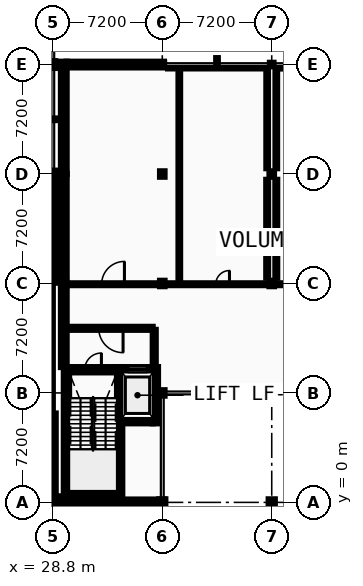
"""IFC4 building model, lengths in metres.
Left out: names, types, materials, properties, quantities, classifications, styles, units other than length and angle.
Written with IfcOpenShell. Run it as: python <this file> out.ifc"""

import sys

from ifc_helpers import new_model, si_unit, direction, frame, frame_2d, origin, origin_2d, place, context, subcontext, project, spatial, rectangle, hollow_circle, i_section, extrude, element, fill, save


model = new_model("IFC4")
c1 = context("Model", 3, precision=1e-05, world=origin(), true_north=direction((0.0, 1.0)))
c2 = subcontext(c1, "Body", "Model", "MODEL_VIEW")
j1 = project(units=[si_unit("LENGTHUNIT", "METRE"), si_unit("PLANEANGLEUNIT", "RADIAN")], contexts=[c1])
p1 = place(None, origin())
s1 = spatial("IfcSite", under=j1, at=p1, CompositionType="ELEMENT")
p2 = place(p1, origin())
s2 = spatial("IfcBuilding", under=s1, at=p2, CompositionType="ELEMENT")
p3 = place(p2, frame((0.0, 0.0, 9.6)))
s3 = spatial("IfcBuildingStorey", under=s2, at=p3, CompositionType="ELEMENT", Elevation=9.6)
for number, where, z_axis, x_axis in (
    (1, (28.8, 0.0, 0.0), (0.0, 0.0, 1.0), (1.0, 0.0, 0.0)),
    (2, (28.8, 21.6, 0.0), (0.0, 0.0, 1.0), (1.0, 0.0, 0.0)),
    (3, (28.8, 28.8, 0.0), (0.0, 0.0, 1.0), (1.0, 0.0, 0.0)),
):
    element("IfcColumn", number, at=place(p3, frame(where, z_axis=z_axis, x_axis=x_axis)), inside=s3, PredefinedType="COLUMN", context=c2, shape_type="SweptSolid", body=[
        extrude(i_section(OverallWidth=0.3, OverallDepth=0.45, WebThickness=0.014, FlangeThickness=0.026, FilletRadius=0.027, at=origin_2d()), origin(), (0.0, 0.0, 1.0), 4.4),
    ])
for number, where, z_axis, x_axis in (
    (4, (29.52, 0.0, 0.0), (0.0, 0.0, 1.0), (1.0, 0.0, 0.0)),
    (5, (29.52, 14.4, 0.0), (0.0, 0.0, 1.0), (1.0, 0.0, 0.0)),
    (6, (29.52, 21.6, 0.0), (0.0, 0.0, 1.0), (1.0, 0.0, 0.0)),
):
    element("IfcColumn", number, at=place(p3, frame(where, z_axis=z_axis, x_axis=x_axis)), inside=s3, PredefinedType="COLUMN", context=c2, shape_type="SweptSolid", body=[
        extrude(i_section(OverallWidth=0.3, OverallDepth=0.36, WebThickness=0.012, FlangeThickness=0.022, FilletRadius=0.027, at=origin_2d()), origin(), (0.0, 0.0, 1.0), 4.4),
    ])
p4 = place(p3, frame((29.52, 28.8, 0.0), z_axis=(0.0, 0.0, 1.0), x_axis=(1.0, 0.0, 0.0)))
e7 = element("IfcColumn", 7, at=p4, inside=s3, PredefinedType="COLUMN", context=c2, shape_type="SweptSolid", body=[
    extrude(i_section(OverallWidth=0.24, OverallDepth=0.24, WebThickness=0.01, FlangeThickness=0.017, FilletRadius=0.021, at=origin_2d()), origin(), (0.0, 0.0, 1.0), 4.4),
])
p5 = place(p3, frame((36.0, 0.0, 0.0), z_axis=(0.0, 0.0, 1.0), x_axis=(1.0, 0.0, 0.0)))
e8 = element("IfcColumn", 8, at=p5, inside=s3, PredefinedType="COLUMN", context=c2, shape_type="SweptSolid", body=[
    extrude(hollow_circle(Radius=0.203, WallThickness=0.016, at=origin_2d()), origin(), (0.0, 0.0, 1.0), 4.4),
])
for number, where, z_axis, x_axis in (
    (9, (36.0, 7.2, 0.0), (0.0, 0.0, 1.0), (1.0, 0.0, 0.0)),
    (10, (36.0, 14.4, 0.0), (0.0, 0.0, 1.0), (1.0, 0.0, 0.0)),
    (11, (36.0, 21.6, 0.0), (0.0, 0.0, 1.0), (1.0, 0.0, 0.0)),
):
    element("IfcColumn", number, at=place(p3, frame(where, z_axis=z_axis, x_axis=x_axis)), inside=s3, PredefinedType="COLUMN", context=c2, shape_type="SweptSolid", body=[
        extrude(i_section(OverallWidth=0.3, OverallDepth=0.36, WebThickness=0.012, FlangeThickness=0.022, FilletRadius=0.027, at=origin_2d()), origin(), (0.0, 0.0, 1.0), 4.4),
    ])
p6 = place(p3, frame((36.0, 28.8, 0.0), z_axis=(0.0, 0.0, 1.0), x_axis=(1.0, 0.0, 0.0)))
e12 = element("IfcColumn", 12, at=p6, inside=s3, PredefinedType="COLUMN", context=c2, shape_type="SweptSolid", body=[
    extrude(i_section(OverallWidth=0.24, OverallDepth=0.24, WebThickness=0.01, FlangeThickness=0.017, FilletRadius=0.021, at=origin_2d()), origin(), (0.0, 0.0, 1.0), 4.4),
])
p7 = place(p3, frame((43.2, 0.0, 0.0), z_axis=(0.0, 0.0, 1.0), x_axis=(1.0, 0.0, 0.0)))
e13 = element("IfcColumn", 13, at=p7, inside=s3, PredefinedType="COLUMN", context=c2, shape_type="SweptSolid", body=[
    extrude(hollow_circle(Radius=0.203, WallThickness=0.016, at=origin_2d()), origin(), (0.0, 0.0, 1.0), 4.4),
])
for number, where, z_axis, x_axis in (
    (14, (43.2, 7.2, 0.0), (0.0, 0.0, 1.0), (1.0, 0.0, 0.0)),
    (15, (43.2, 14.4, 0.0), (0.0, 0.0, 1.0), (1.0, 0.0, 0.0)),
    (16, (43.2, 21.6, 0.0), (0.0, 0.0, 1.0), (1.0, 0.0, 0.0)),
):
    element("IfcColumn", number, at=place(p3, frame(where, z_axis=z_axis, x_axis=x_axis)), inside=s3, PredefinedType="COLUMN", context=c2, shape_type="SweptSolid", body=[
        extrude(i_section(OverallWidth=0.3, OverallDepth=0.36, WebThickness=0.012, FlangeThickness=0.022, FilletRadius=0.027, at=origin_2d()), origin(), (0.0, 0.0, 1.0), 4.4),
    ])
p8 = place(p3, frame((43.2, 28.8, 0.0), z_axis=(0.0, 0.0, 1.0), x_axis=(1.0, 0.0, 0.0)))
e17 = element("IfcColumn", 17, at=p8, inside=s3, PredefinedType="COLUMN", context=c2, shape_type="SweptSolid", body=[
    extrude(i_section(OverallWidth=0.24, OverallDepth=0.24, WebThickness=0.01, FlangeThickness=0.017, FilletRadius=0.021, at=origin_2d()), origin(), (0.0, 0.0, 1.0), 4.4),
])
p9 = place(p3, frame((28.8, -0.19, 0.0), z_axis=(0.0, 0.0, 1.0), x_axis=(0.0, 1.0, 0.0)))
e18 = element("IfcWall", 18, at=p9, inside=s3, PredefinedType="STANDARD", context=c2, shape_type="SweptSolid", body=[
    extrude(rectangle(XDim=6.04, YDim=0.38, at=frame_2d((3.02, 0.0))), origin(), (0.0, 0.0, 1.0), 4.2),
])
p10 = place(p9, frame((2.505, 0.0, 0.95)))
e19 = element("IfcOpeningElement", 19, at=p10, cuts=e18, PredefinedType="OPENING", context=c2, shape_type="SweptSolid", body=[
    extrude(rectangle(XDim=1.03, YDim=1.332, at=frame_2d((0.515, 0.666))), frame((0.0, 0.2, 0.0), z_axis=(0.0, -1.0, 0.0), x_axis=(1.0, 0.0, 0.0)), (0.0, 0.0, 1.0), 0.4),
])
p11 = place(p3, frame((28.8, 14.45, 0.0), z_axis=(0.0, 0.0, 1.0), x_axis=(0.0, 1.0, 0.0)))
e20 = element("IfcWall", 20, at=p11, inside=s3, PredefinedType="STANDARD", context=c2, shape_type="SweptSolid", body=[
    extrude(rectangle(XDim=7.15, YDim=0.38, at=frame_2d((3.575, 0.0))), origin(), (0.0, 0.0, 1.0), 4.2),
])
p12 = place(p11, frame((1.613, 0.0, 0.95)))
e21 = element("IfcOpeningElement", 21, at=p12, cuts=e20, PredefinedType="OPENING", context=c2, shape_type="SweptSolid", body=[
    extrude(rectangle(XDim=1.064, YDim=1.332, at=frame_2d((0.532, 0.666))), frame((0.0, 0.2, 0.0), z_axis=(0.0, -1.0, 0.0), x_axis=(1.0, 0.0, 0.0)), (0.0, 0.0, 1.0), 0.4),
])
p13 = place(p11, frame((4.473, 0.0, 0.95)))
e22 = element("IfcOpeningElement", 22, at=p13, cuts=e20, PredefinedType="OPENING", context=c2, shape_type="SweptSolid", body=[
    extrude(rectangle(XDim=1.064, YDim=1.332, at=frame_2d((0.532, 0.666))), frame((0.0, 0.2, 0.0), z_axis=(0.0, -1.0, 0.0), x_axis=(1.0, 0.0, 0.0)), (0.0, 0.0, 1.0), 0.4),
])
p14 = place(p3, frame((29.71, 0.0, 0.0), z_axis=(0.0, 0.0, 1.0), x_axis=(1.0, 0.0, 0.0)))
e23 = element("IfcWall", 23, at=p14, inside=s3, PredefinedType="STANDARD", context=c2, shape_type="SweptSolid", body=[
    extrude(rectangle(XDim=6.4, YDim=0.38, at=frame_2d((3.2, 0.0))), origin(), (0.0, 0.0, 1.0), 3.895),
])
p15 = place(p3, frame((36.11, 28.8, 0.0), z_axis=(0.0, 0.0, 1.0), x_axis=(-1.0, 0.0, 0.0)))
e24 = element("IfcWall", 24, at=p15, inside=s3, PredefinedType="STANDARD", context=c2, shape_type="SweptSolid", body=[
    extrude(rectangle(XDim=6.4, YDim=0.38, at=frame_2d((3.2, 0.0))), origin(), (0.0, 0.0, 1.0), 3.9),
])
p16 = place(p3, frame((29.52, 0.4, 0.0), z_axis=(0.0, 0.0, 1.0), x_axis=(0.0, -1.0, 0.0)))
e25 = element("IfcWall", 25, at=p16, inside=s3, PredefinedType="STANDARD", context=c2, shape_type="SweptSolid", body=[
    extrude(rectangle(XDim=0.59, YDim=0.38, at=frame_2d((0.295, 0.0))), origin(), (0.0, 0.0, 1.0), 4.2),
])
p17 = place(p3, frame((29.52, 14.4, 0.0), z_axis=(0.0, 0.0, 1.0), x_axis=(0.0, -1.0, 0.0)))
e26 = element("IfcWall", 26, at=p17, inside=s3, PredefinedType="STANDARD", context=c2, shape_type="SweptSolid", body=[
    extrude(rectangle(XDim=5.5, YDim=0.38, at=frame_2d((2.75, 0.0))), origin(), (0.0, 0.0, 1.0), 4.2),
])
p18 = place(p3, frame((29.52, 21.6, 0.0), z_axis=(0.0, 0.0, 1.0), x_axis=(0.0, -1.0, 0.0)))
e27 = element("IfcWall", 27, at=p18, inside=s3, PredefinedType="STANDARD", context=c2, shape_type="SweptSolid", body=[
    extrude(rectangle(XDim=7.2, YDim=0.38, at=frame_2d((3.6, 0.0))), origin(), (0.0, 0.0, 1.0), 3.895),
])
p19 = place(p18, frame((1.662, 0.0, 0.95)))
e28 = element("IfcOpeningElement", 28, at=p19, cuts=e27, PredefinedType="OPENING", context=c2, shape_type="SweptSolid", body=[
    extrude(rectangle(XDim=0.996, YDim=1.368, at=frame_2d((0.498, 0.684))), frame((0.0, 0.2, 0.0), z_axis=(0.0, -1.0, 0.0), x_axis=(1.0, 0.0, 0.0)), (0.0, 0.0, 1.0), 0.4),
])
p20 = place(p18, frame((4.542, 0.0, 0.95)))
e29 = element("IfcOpeningElement", 29, at=p20, cuts=e27, PredefinedType="OPENING", context=c2, shape_type="SweptSolid", body=[
    extrude(rectangle(XDim=0.996, YDim=1.368, at=frame_2d((0.498, 0.684))), frame((0.0, 0.2, 0.0), z_axis=(0.0, -1.0, 0.0), x_axis=(1.0, 0.0, 0.0)), (0.0, 0.0, 1.0), 0.4),
])
p21 = place(p3, frame((29.52, 28.99, 0.0), z_axis=(0.0, 0.0, 1.0), x_axis=(0.0, -1.0, 0.0)))
e30 = element("IfcWall", 30, at=p21, inside=s3, PredefinedType="STANDARD", context=c2, shape_type="SweptSolid", body=[
    extrude(rectangle(XDim=7.39, YDim=0.38, at=frame_2d((3.695, 0.0))), origin(), (0.0, 0.0, 1.0), 3.9),
])
p22 = place(p21, frame((1.702, 0.0, 0.95)))
e31 = element("IfcOpeningElement", 31, at=p22, cuts=e30, PredefinedType="OPENING", context=c2, shape_type="SweptSolid", body=[
    extrude(rectangle(XDim=1.03, YDim=1.368, at=frame_2d((0.515, 0.684))), frame((0.0, 0.2, 0.0), z_axis=(0.0, -1.0, 0.0), x_axis=(1.0, 0.0, 0.0)), (0.0, 0.0, 1.0), 0.4),
])
p23 = place(p21, frame((4.658, 0.0, 0.95)))
e32 = element("IfcOpeningElement", 32, at=p23, cuts=e30, PredefinedType="OPENING", context=c2, shape_type="SweptSolid", body=[
    extrude(rectangle(XDim=1.03, YDim=1.368, at=frame_2d((0.515, 0.684))), frame((0.0, 0.2, 0.0), z_axis=(0.0, -1.0, 0.0), x_axis=(1.0, 0.0, 0.0)), (0.0, 0.0, 1.0), 0.4),
])
p24 = place(p3, frame((28.6, 5.85, 0.0), z_axis=(0.0, 0.0, 1.0), x_axis=(0.0, 1.0, 0.0)))
e33 = element("IfcWall", 33, at=p24, inside=s3, PredefinedType="SHEAR", context=c2, shape_type="SweptSolid", body=[
    extrude(rectangle(XDim=8.6, YDim=0.4, at=frame_2d((4.3, 0.0))), origin(), (0.0, 0.0, 1.0), 4.2),
])
p25 = place(p3, frame((29.87, 0.575, 0.0), z_axis=(0.0, 0.0, 1.0), x_axis=(1.0, 0.0, 0.0)))
e34 = element("IfcWall", 34, at=p25, inside=s3, PredefinedType="SHEAR", context=c2, shape_type="SweptSolid", body=[
    extrude(rectangle(XDim=3.15, YDim=0.35, at=frame_2d((1.575, 0.0))), origin(), (0.0, 0.0, 1.0), 4.2),
])
p26 = place(p3, frame((29.87, 8.725, 0.0), z_axis=(0.0, 0.0, 1.0), x_axis=(1.0, 0.0, 0.0)))
e35 = element("IfcWall", 35, at=p26, inside=s3, PredefinedType="SHEAR", context=c2, shape_type="SweptSolid", body=[
    extrude(rectangle(XDim=3.15, YDim=0.35, at=frame_2d((1.575, 0.0))), origin(), (0.0, 0.0, 1.0), 4.2),
])
p27 = place(p26, frame((1.025, 0.0, 0.0)))
e36 = element("IfcOpeningElement", 36, at=p27, cuts=e35, PredefinedType="OPENING", context=c2, shape_type="SweptSolid", body=[
    extrude(rectangle(XDim=1.1, YDim=2.15, at=frame_2d((0.55, 1.075))), frame((0.0, 0.185, 0.0), z_axis=(0.0, -1.0, 0.0), x_axis=(1.0, 0.0, 0.0)), (0.0, 0.0, 1.0), 0.37),
])
for number, where, z_axis, x_axis in (
    (37, (29.695, 0.4, 0.0), (0.0, 0.0, 1.0), (0.0, 1.0, 0.0)),
    (38, (33.195, 0.4, 0.0), (0.0, 0.0, 1.0), (0.0, 1.0, 0.0)),
):
    element("IfcWall", number, at=place(p3, frame(where, z_axis=z_axis, x_axis=x_axis)), inside=s3, PredefinedType="SHEAR", context=c2, shape_type="SweptSolid", body=[
        extrude(rectangle(XDim=8.5, YDim=0.35, at=frame_2d((4.25, 0.0))), origin(), (0.0, 0.0, 1.0), 4.2),
    ])
p28 = place(p3, frame((33.37, 5.375, 0.0), z_axis=(0.0, 0.0, 1.0), x_axis=(1.0, 0.0, 0.0)))
e39 = element("IfcWall", 39, at=p28, inside=s3, PredefinedType="SHEAR", context=c2, shape_type="SweptSolid", body=[
    extrude(rectangle(XDim=2.0, YDim=0.35, at=frame_2d((1.0, 0.0))), origin(), (0.0, 0.0, 1.0), 4.2),
])
p29 = place(p3, frame((33.37, 8.725, 0.0), z_axis=(0.0, 0.0, 1.0), x_axis=(1.0, 0.0, 0.0)))
e40 = element("IfcWall", 40, at=p29, inside=s3, PredefinedType="SHEAR", context=c2, shape_type="SweptSolid", body=[
    extrude(rectangle(XDim=2.0, YDim=0.35, at=frame_2d((1.0, 0.0))), origin(), (0.0, 0.0, 1.0), 4.2),
])
p30 = place(p29, frame((0.4, 0.0, 0.0)))
e41 = element("IfcOpeningElement", 41, at=p30, cuts=e40, PredefinedType="OPENING", context=c2, shape_type="SweptSolid", body=[
    extrude(rectangle(XDim=1.2, YDim=2.2, at=frame_2d((0.6, 1.1))), frame((0.0, 0.185, 0.0), z_axis=(0.0, -1.0, 0.0), x_axis=(1.0, 0.0, 0.0)), (0.0, 0.0, 1.0), 0.37),
])
p31 = place(p3, frame((35.545, 5.2, 0.0), z_axis=(0.0, 0.0, 1.0), x_axis=(0.0, 1.0, 0.0)))
e42 = element("IfcWall", 42, at=p31, inside=s3, PredefinedType="SHEAR", context=c2, shape_type="SweptSolid", body=[
    extrude(rectangle(XDim=3.7, YDim=0.35, at=frame_2d((1.85, 0.0))), origin(), (0.0, 0.0, 1.0), 4.2),
])
p32 = place(p3, frame((29.87, 11.45, 0.0), z_axis=(0.0, 0.0, 1.0), x_axis=(1.0, 0.0, 0.0)))
e43 = element("IfcWall", 43, at=p32, inside=s3, PredefinedType="PARTITIONING", context=c2, shape_type="SweptSolid", body=[
    extrude(rectangle(XDim=5.5, YDim=0.2, at=frame_2d((2.75, 0.0))), origin(), (0.0, 0.0, 1.0), 4.2),
])
p33 = place(p32, frame((1.95, 0.0, 0.0)))
e44 = element("IfcOpeningElement", 44, at=p33, cuts=e43, PredefinedType="OPENING", context=c2, shape_type="SweptSolid", body=[
    extrude(rectangle(XDim=1.6, YDim=2.2, at=frame_2d((0.8, 1.1))), frame((0.0, 0.11, 0.0), z_axis=(0.0, -1.0, 0.0), x_axis=(1.0, 0.0, 0.0)), (0.0, 0.0, 1.0), 0.22),
])
p34 = place(p3, frame((35.47, 8.9, 0.0), z_axis=(0.0, 0.0, 1.0), x_axis=(0.0, 1.0, 0.0)))
e45 = element("IfcWall", 45, at=p34, inside=s3, PredefinedType="PARTITIONING", context=c2, shape_type="SweptSolid", body=[
    extrude(rectangle(XDim=2.45, YDim=0.2, at=frame_2d((1.225, 0.0))), origin(), (0.0, 0.0, 1.0), 4.2),
])
p35 = place(p3, frame((29.9, 14.35, 0.0), z_axis=(0.0, 0.0, 1.0), x_axis=(1.0, 0.0, 0.0)))
e46 = element("IfcWall", 46, at=p35, inside=s3, PredefinedType="PARTITIONING", context=c2, shape_type="SweptSolid", body=[
    extrude(rectangle(XDim=5.72, YDim=0.125, at=frame_2d((2.86, 0.0))), origin(), (0.0, 0.0, 1.0), 3.895),
])
p36 = place(p35, frame((2.11, 0.0, 0.0)))
e47 = element("IfcOpeningElement", 47, at=p36, cuts=e46, PredefinedType="OPENING", context=c2, shape_type="SweptSolid", body=[
    extrude(rectangle(XDim=1.5, YDim=2.2, at=frame_2d((0.75, 1.1))), frame((0.0, 0.073, 0.0), z_axis=(0.0, -1.0, 0.0), x_axis=(1.0, 0.0, 0.0)), (0.0, 0.0, 1.0), 0.145),
])
p37 = place(p3, frame((36.38, 14.35, 0.0), z_axis=(0.0, 0.0, 1.0), x_axis=(1.0, 0.0, 0.0)))
e48 = element("IfcWall", 48, at=p37, inside=s3, PredefinedType="PARTITIONING", context=c2, shape_type="SweptSolid", body=[
    extrude(rectangle(XDim=6.44, YDim=0.125, at=frame_2d((3.22, 0.0))), origin(), (0.0, 0.0, 1.0), 3.895),
])
p38 = place(p37, frame((3.14, 0.0, 0.0)))
e49 = element("IfcOpeningElement", 49, at=p38, cuts=e48, PredefinedType="OPENING", context=c2, shape_type="SweptSolid", body=[
    extrude(rectangle(XDim=0.9, YDim=2.1, at=frame_2d((0.45, 1.05))), frame((0.0, 0.073, 0.0), z_axis=(0.0, -1.0, 0.0), x_axis=(1.0, 0.0, 0.0)), (0.0, 0.0, 1.0), 0.145),
])
p39 = place(p3, frame((43.58, 14.35, 0.0), z_axis=(0.0, 0.0, 1.0), x_axis=(1.0, 0.0, 0.0)))
e50 = element("IfcWall", 50, at=p39, inside=s3, PredefinedType="PARTITIONING", context=c2, shape_type="SweptSolid", body=[
    extrude(rectangle(XDim=6.44, YDim=0.125, at=frame_2d((3.22, 0.0))), origin(), (0.0, 0.0, 1.0), 3.895),
])
p40 = place(p39, frame((2.31, 0.0, 0.0)))
e51 = element("IfcOpeningElement", 51, at=p40, cuts=e50, PredefinedType="OPENING", context=c2, shape_type="SweptSolid", body=[
    extrude(rectangle(XDim=1.0, YDim=2.1, at=frame_2d((0.5, 1.05))), frame((0.0, 0.073, 0.0), z_axis=(0.0, -1.0, 0.0), x_axis=(1.0, 0.0, 0.0)), (0.0, 0.0, 1.0), 0.145),
])
p41 = place(p3, frame((36.38, 28.6, 0.0), z_axis=(0.0, 0.0, 1.0), x_axis=(1.0, 0.0, 0.0)))
e52 = element("IfcWall", 52, at=p41, inside=s3, PredefinedType="PARTITIONING", context=c2, shape_type="SweptSolid", body=[
    extrude(rectangle(XDim=6.44, YDim=0.11, at=frame_2d((3.22, 0.0))), origin(), (0.0, 0.0, 1.0), 3.9),
])
p42 = place(p3, frame((43.58, 28.6, 0.0), z_axis=(0.0, 0.0, 1.0), x_axis=(1.0, 0.0, 0.0)))
e53 = element("IfcWall", 53, at=p42, inside=s3, PredefinedType="PARTITIONING", context=c2, shape_type="SweptSolid", body=[
    extrude(rectangle(XDim=6.44, YDim=0.125, at=frame_2d((3.22, 0.0))), origin(), (0.0, 0.0, 1.0), 3.9),
])
p43 = place(p3, frame((37.12, 14.413, 0.0), z_axis=(0.0, 0.0, 1.0), x_axis=(0.0, 1.0, 0.0)))
e54 = element("IfcWall", 54, at=p43, inside=s3, PredefinedType="PARTITIONING", context=c2, shape_type="SweptSolid", body=[
    extrude(rectangle(XDim=14.132, YDim=0.11, at=frame_2d((7.066, 0.0))), origin(), (0.0, 0.0, 1.0), 4.2),
])
p44 = place(p3, frame((42.9, 14.78, 0.0), z_axis=(0.0, 0.0, 1.0), x_axis=(0.0, 1.0, 0.0)))
e55 = element("IfcWall", 55, at=p44, inside=s3, PredefinedType="PARTITIONING", context=c2, shape_type="SweptSolid", body=[
    extrude(rectangle(XDim=6.44, YDim=0.125, at=frame_2d((3.22, 0.0))), origin(), (0.0, 0.0, 1.0), 4.2),
])
p45 = place(p3, frame((42.9, 21.98, 0.0), z_axis=(0.0, 0.0, 1.0), x_axis=(0.0, 1.0, 0.0)))
e56 = element("IfcWall", 56, at=p45, inside=s3, PredefinedType="PARTITIONING", context=c2, shape_type="SweptSolid", body=[
    extrude(rectangle(XDim=6.44, YDim=0.11, at=frame_2d((3.22, 0.0))), origin(), (0.0, 0.0, 1.0), 4.2),
])
p46 = place(p3, frame((43.5, 14.78, 0.0), z_axis=(0.0, 0.0, 1.0), x_axis=(0.0, 1.0, 0.0)))
e57 = element("IfcWall", 57, at=p46, inside=s3, PredefinedType="PARTITIONING", context=c2, shape_type="SweptSolid", body=[
    extrude(rectangle(XDim=6.44, YDim=0.125, at=frame_2d((3.22, 0.0))), origin(), (0.0, 0.0, 1.0), 4.2),
])
p47 = place(p3, frame((43.5, 21.98, 0.0), z_axis=(0.0, 0.0, 1.0), x_axis=(0.0, 1.0, 0.0)))
e58 = element("IfcWall", 58, at=p47, inside=s3, PredefinedType="PARTITIONING", context=c2, shape_type="SweptSolid", body=[
    extrude(rectangle(XDim=6.44, YDim=0.11, at=frame_2d((3.22, 0.0))), origin(), (0.0, 0.0, 1.0), 4.2),
])
p48 = place(p10, origin())
e59 = element("IfcWindow", 59, at=p48, inside=s3, PartitioningType="SINGLE_PANEL", PredefinedType="WINDOW", context=c2, shape_type="SweptSolid", body=[
    extrude(rectangle(XDim=1.03, YDim=1.332, at=frame_2d((0.515, 0.666))), frame((0.0, 0.03, 0.0), z_axis=(0.0, -1.0, 0.0), x_axis=(1.0, 0.0, 0.0)), (0.0, 0.0, 1.0), 0.06),
])
fill(e19, e59)
p49 = place(p12, origin())
e60 = element("IfcWindow", 60, at=p49, inside=s3, PartitioningType="SINGLE_PANEL", PredefinedType="WINDOW", context=c2, shape_type="SweptSolid", body=[
    extrude(rectangle(XDim=1.064, YDim=1.332, at=frame_2d((0.532, 0.666))), frame((0.0, 0.03, 0.0), z_axis=(0.0, -1.0, 0.0), x_axis=(1.0, 0.0, 0.0)), (0.0, 0.0, 1.0), 0.06),
])
fill(e21, e60)
p50 = place(p13, origin())
e61 = element("IfcWindow", 61, at=p50, inside=s3, PartitioningType="SINGLE_PANEL", PredefinedType="WINDOW", context=c2, shape_type="SweptSolid", body=[
    extrude(rectangle(XDim=1.064, YDim=1.332, at=frame_2d((0.532, 0.666))), frame((0.0, 0.03, 0.0), z_axis=(0.0, -1.0, 0.0), x_axis=(1.0, 0.0, 0.0)), (0.0, 0.0, 1.0), 0.06),
])
fill(e22, e61)
p51 = place(p19, origin())
e62 = element("IfcWindow", 62, at=p51, inside=s3, PartitioningType="SINGLE_PANEL", PredefinedType="WINDOW", context=c2, shape_type="SweptSolid", body=[
    extrude(rectangle(XDim=0.996, YDim=1.368, at=frame_2d((0.498, 0.684))), frame((0.0, 0.03, 0.0), z_axis=(0.0, -1.0, 0.0), x_axis=(1.0, 0.0, 0.0)), (0.0, 0.0, 1.0), 0.06),
])
fill(e28, e62)
p52 = place(p20, origin())
e63 = element("IfcWindow", 63, at=p52, inside=s3, PartitioningType="SINGLE_PANEL", PredefinedType="WINDOW", context=c2, shape_type="SweptSolid", body=[
    extrude(rectangle(XDim=0.996, YDim=1.368, at=frame_2d((0.498, 0.684))), frame((0.0, 0.03, 0.0), z_axis=(0.0, -1.0, 0.0), x_axis=(1.0, 0.0, 0.0)), (0.0, 0.0, 1.0), 0.06),
])
fill(e29, e63)
p53 = place(p22, origin())
e64 = element("IfcWindow", 64, at=p53, inside=s3, PartitioningType="SINGLE_PANEL", PredefinedType="WINDOW", context=c2, shape_type="SweptSolid", body=[
    extrude(rectangle(XDim=1.03, YDim=1.368, at=frame_2d((0.515, 0.684))), frame((0.0, 0.03, 0.0), z_axis=(0.0, -1.0, 0.0), x_axis=(1.0, 0.0, 0.0)), (0.0, 0.0, 1.0), 0.06),
])
fill(e31, e64)
p54 = place(p23, origin())
e65 = element("IfcWindow", 65, at=p54, inside=s3, PartitioningType="SINGLE_PANEL", PredefinedType="WINDOW", context=c2, shape_type="SweptSolid", body=[
    extrude(rectangle(XDim=1.03, YDim=1.368, at=frame_2d((0.515, 0.684))), frame((0.0, 0.03, 0.0), z_axis=(0.0, -1.0, 0.0), x_axis=(1.0, 0.0, 0.0)), (0.0, 0.0, 1.0), 0.06),
])
fill(e32, e65)
p55 = place(p27, frame((1.1, 0.0, 0.0), z_axis=(0.0, 0.0, 1.0), x_axis=(-1.0, 0.0, 0.0)))
e66 = element("IfcDoor", 66, at=p55, inside=s3, OperationType="SINGLE_SWING_RIGHT", PredefinedType="DOOR", context=c2, shape_type="SweptSolid", body=[
    extrude(rectangle(XDim=1.1, YDim=2.15, at=frame_2d((0.55, 1.075))), frame((0.0, 0.025, 0.0), z_axis=(0.0, -1.0, 0.0), x_axis=(1.0, 0.0, 0.0)), (0.0, 0.0, 1.0), 0.05),
])
fill(e36, e66)
p56 = place(p30, origin())
e67 = element("IfcDoor", 67, at=p56, inside=s3, OperationType="SLIDING_TO_RIGHT", PredefinedType="DOOR", context=c2, shape_type="SweptSolid", body=[
    extrude(rectangle(XDim=1.2, YDim=2.2, at=frame_2d((0.6, 1.1))), frame((0.0, 0.025, 0.0), z_axis=(0.0, -1.0, 0.0), x_axis=(1.0, 0.0, 0.0)), (0.0, 0.0, 1.0), 0.05),
])
fill(e41, e67)
p57 = place(p33, origin())
e68 = element("IfcDoor", 68, at=p57, inside=s3, OperationType="DOUBLE_DOOR_SINGLE_SWING", PredefinedType="DOOR", context=c2, shape_type="SweptSolid", body=[
    extrude(rectangle(XDim=1.6, YDim=2.2, at=frame_2d((0.8, 1.1))), frame((0.0, 0.025, 0.0), z_axis=(0.0, -1.0, 0.0), x_axis=(1.0, 0.0, 0.0)), (0.0, 0.0, 1.0), 0.05),
])
fill(e44, e68)
p58 = place(p38, frame((0.9, 0.0, 0.0), z_axis=(0.0, 0.0, 1.0), x_axis=(-1.0, 0.0, 0.0)))
e69 = element("IfcDoor", 69, at=p58, inside=s3, OperationType="SINGLE_SWING_RIGHT", PredefinedType="DOOR", context=c2, shape_type="SweptSolid", body=[
    extrude(rectangle(XDim=0.9, YDim=2.1, at=frame_2d((0.45, 1.05))), frame((0.0, 0.025, 0.0), z_axis=(0.0, -1.0, 0.0), x_axis=(1.0, 0.0, 0.0)), (0.0, 0.0, 1.0), 0.05),
])
fill(e49, e69)
p59 = place(p36, frame((1.5, 0.0, 0.0), z_axis=(0.0, 0.0, 1.0), x_axis=(-1.0, 0.0, 0.0)))
e70 = element("IfcDoor", 70, at=p59, inside=s3, OperationType="DOUBLE_DOOR_SINGLE_SWING", PredefinedType="DOOR", context=c2, shape_type="SweptSolid", body=[
    extrude(rectangle(XDim=1.5, YDim=2.2, at=frame_2d((0.75, 1.1))), frame((0.0, 0.025, 0.0), z_axis=(0.0, -1.0, 0.0), x_axis=(1.0, 0.0, 0.0)), (0.0, 0.0, 1.0), 0.05),
])
fill(e47, e70)
save(model, sys.argv[1])
